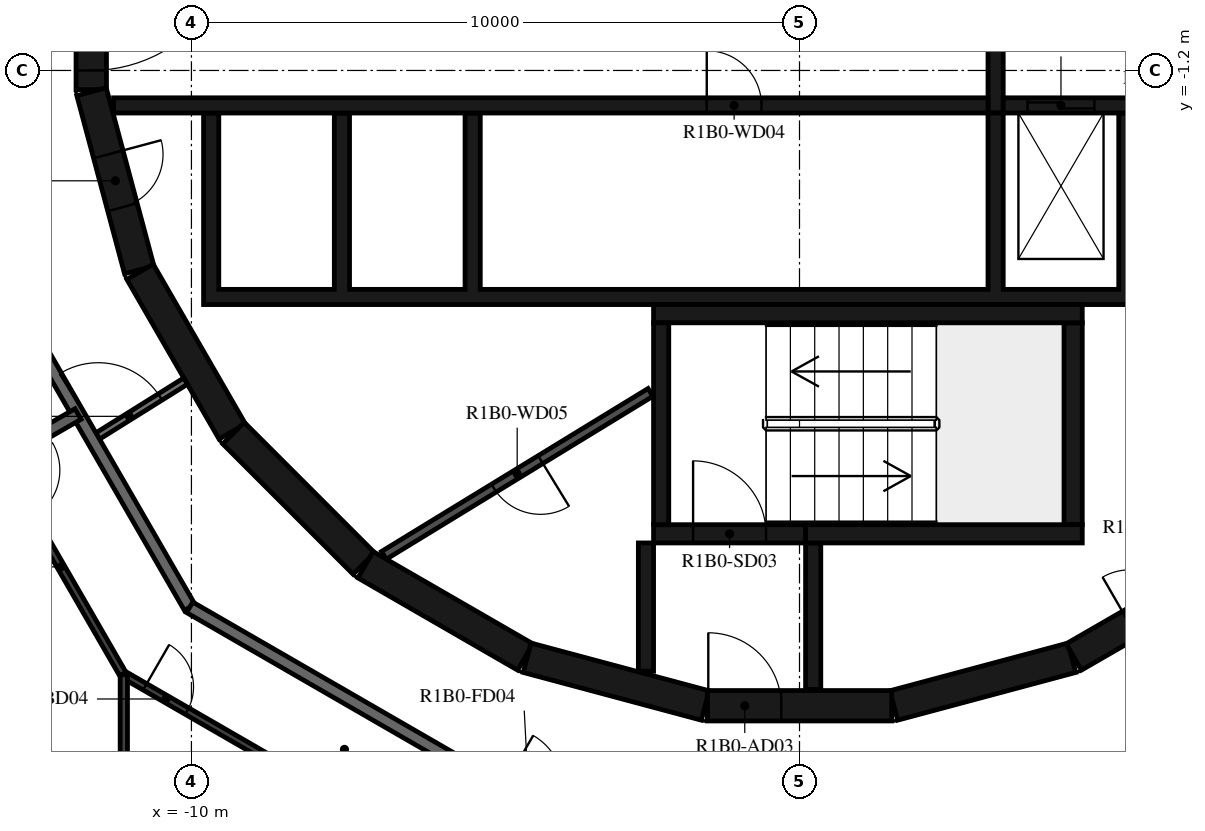
"""IFC4 building model, lengths in metres.
Left out: names, types, materials, properties, quantities, classifications, styles, units other than length and angle.
Written with IfcOpenShell. Run it as: python <this file> out.ifc"""

import sys

from ifc_helpers import new_model, si_unit, direction, frame, frame_2d, origin, place, context, subcontext, project, spatial, polyline, rectangle, outline, extrude, element, fill, save


model = new_model("IFC4")
c1 = context("Model", 3, precision=1e-05, world=origin(), true_north=direction((0.0, 1.0)))
c2 = subcontext(c1, "Body", "Model", "MODEL_VIEW")
j1 = project(units=[si_unit("LENGTHUNIT", "METRE"), si_unit("PLANEANGLEUNIT", "RADIAN")], contexts=[c1])
p1 = place(None, origin())
s1 = spatial("IfcSite", under=j1, at=p1, CompositionType="ELEMENT")
p2 = place(p1, origin())
s2 = spatial("IfcBuilding", under=s1, at=p2, CompositionType="ELEMENT")
p3 = place(p2, frame((0.0, 0.0, 52.4)))
s3 = spatial("IfcBuildingStorey", under=s2, at=p3, CompositionType="ELEMENT", Elevation=52.4)
p4 = place(p3, frame((1.55, -11.643, 0.0), z_axis=(0.0, 0.0, 1.0), x_axis=(0.965948410781, 0.258734743916, 0.0)))
e1 = element("IfcWall", 1, at=p4, inside=s3, PredefinedType="SHEAR", context=c2, shape_type="SweptSolid", body=[
    extrude(rectangle(XDim=3.033, YDim=0.5, at=frame_2d((1.516, 0.0))), origin(), (0.0, 0.0, 1.0), 3.12),
])
p5 = place(p3, frame((4.51, -10.845, 0.0), z_axis=(0.0, 0.0, 1.0), x_axis=(0.865975092491, 0.500087131594, 0.0)))
e2 = element("IfcWall", 2, at=p5, inside=s3, PredefinedType="SHEAR", context=c2, shape_type="SweptSolid", body=[
    extrude(rectangle(XDim=3.033, YDim=0.5, at=frame_2d((1.516, 0.0))), origin(), (0.0, 0.0, 1.0), 3.12),
])
p6 = place(p5, frame((1.066, 0.0, 0.0)))
e3 = element("IfcOpeningElement", 3, at=p6, cuts=e2, PredefinedType="OPENING", context=c2, shape_type="SweptSolid", body=[
    extrude(rectangle(XDim=0.9, YDim=2.1, at=frame_2d((0.45, 1.05))), frame((0.0, 0.26, 0.0), z_axis=(0.0, -1.0, 0.0), x_axis=(1.0, 0.0, 0.0)), (0.0, 0.0, 1.0), 0.52),
])
p7 = place(p3, frame((-11.647, 1.516, 0.0), z_axis=(0.0, 0.0, 1.0), x_axis=(0.0, -1.0, 0.0)))
e4 = element("IfcWall", 4, at=p7, inside=s3, PredefinedType="SHEAR", context=c2, shape_type="SweptSolid", body=[
    extrude(rectangle(XDim=3.033, YDim=0.5, at=frame_2d((1.516, 0.0))), origin(), (0.0, 0.0, 1.0), 3.12),
])
p8 = place(p7, frame((0.316, 0.0, 0.0)))
e5 = element("IfcOpeningElement", 5, at=p8, cuts=e4, PredefinedType="OPENING", context=c2, shape_type="SweptSolid", body=[
    extrude(rectangle(XDim=2.4, YDim=2.1, at=frame_2d((1.2, 1.05))), frame((0.0, 0.26, 0.0), z_axis=(0.0, -1.0, 0.0), x_axis=(1.0, 0.0, 0.0)), (0.0, 0.0, 1.0), 0.52),
])
p9 = place(p3, frame((-11.643, -1.55, 0.0), z_axis=(0.0, 0.0, 1.0), x_axis=(0.258734743916, -0.965948410781, 0.0)))
e6 = element("IfcWall", 6, at=p9, inside=s3, PredefinedType="SHEAR", context=c2, shape_type="SweptSolid", body=[
    extrude(rectangle(XDim=3.033, YDim=0.5, at=frame_2d((1.516, 0.0))), origin(), (0.0, 0.0, 1.0), 3.12),
])
p10 = place(p9, frame((1.066, 0.0, 0.0)))
e7 = element("IfcOpeningElement", 7, at=p10, cuts=e6, PredefinedType="OPENING", context=c2, shape_type="SweptSolid", body=[
    extrude(rectangle(XDim=0.9, YDim=2.1, at=frame_2d((0.45, 1.05))), frame((0.0, 0.26, 0.0), z_axis=(0.0, -1.0, 0.0), x_axis=(1.0, 0.0, 0.0)), (0.0, 0.0, 1.0), 0.52),
])
p11 = place(p3, frame((-10.845, -4.51, 0.0), z_axis=(0.0, 0.0, 1.0), x_axis=(0.500087131594, -0.865975092491, 0.0)))
e8 = element("IfcWall", 8, at=p11, inside=s3, PredefinedType="SHEAR", context=c2, shape_type="SweptSolid", body=[
    extrude(rectangle(XDim=3.033, YDim=0.5, at=frame_2d((1.516, 0.0))), origin(), (0.0, 0.0, 1.0), 3.12),
])
p12 = place(p3, frame((-9.308, -7.164, 0.0), z_axis=(0.0, 0.0, 1.0), x_axis=(0.707106781187, -0.707106781187, 0.0)))
e9 = element("IfcWall", 9, at=p12, inside=s3, PredefinedType="SHEAR", context=c2, shape_type="SweptSolid", body=[
    extrude(rectangle(XDim=3.032, YDim=0.5, at=frame_2d((1.516, 0.0))), origin(), (0.0, 0.0, 1.0), 3.12),
])
for number, where, z_axis, x_axis in (
    (10, (-7.137, -9.329, 0.0), (0.0, 0.0, 1.0), (0.866, -0.5, 0.0)),
    (11, (-4.479, -10.858, 0.0), (0.0, 0.0, 1.0), (0.966, -0.259, 0.0)),
):
    element("IfcWall", number, at=place(p3, frame(where, z_axis=z_axis, x_axis=x_axis)), inside=s3, PredefinedType="SHEAR", context=c2, shape_type="SweptSolid", body=[
        extrude(rectangle(XDim=3.033, YDim=0.5, at=frame_2d((1.516, 0.0))), origin(), (0.0, 0.0, 1.0), 3.12),
    ])
p13 = place(p3, frame((-1.516, -11.647, 0.0), z_axis=(0.0, 0.0, 1.0), x_axis=(1.0, 0.0, 0.0)))
e12 = element("IfcWall", 12, at=p13, inside=s3, PredefinedType="SHEAR", context=c2, shape_type="SweptSolid", body=[
    extrude(rectangle(XDim=3.033, YDim=0.5, at=frame_2d((1.516, 0.0))), origin(), (0.0, 0.0, 1.0), 3.12),
])
p14 = place(p13, frame((0.016, 0.0, 0.0)))
e13 = element("IfcOpeningElement", 13, at=p14, cuts=e12, PredefinedType="OPENING", context=c2, shape_type="SweptSolid", body=[
    extrude(rectangle(XDim=1.2, YDim=2.1, at=frame_2d((0.6, 1.05))), frame((0.0, 0.26, 0.0), z_axis=(0.0, -1.0, 0.0), x_axis=(1.0, 0.0, 0.0)), (0.0, 0.0, 1.0), 0.52),
])
p15 = place(p3, frame((-2.275, -8.67, 0.0), z_axis=(0.0, 0.0, 1.0), x_axis=(0.0, 1.0, 0.0)))
e14 = element("IfcWall", 14, at=p15, inside=s3, PredefinedType="SHEAR", context=c2, shape_type="SweptSolid", body=[
    extrude(rectangle(XDim=3.32, YDim=0.25, at=frame_2d((1.66, 0.0))), origin(), (0.0, 0.0, 1.0), 3.12),
])
p16 = place(p3, frame((-2.4, -5.2, 0.0), z_axis=(0.0, 0.0, 1.0), x_axis=(1.0, 0.0, 0.0)))
e15 = element("IfcWall", 15, at=p16, inside=s3, PredefinedType="SHEAR", context=c2, shape_type="SweptSolid", body=[
    extrude(rectangle(XDim=7.05, YDim=0.3, at=frame_2d((3.525, 0.0))), origin(), (0.0, 0.0, 1.0), 3.12),
])
p17 = place(p3, frame((4.5, -8.67, 0.0), z_axis=(0.0, 0.0, 1.0), x_axis=(0.0, 1.0, 0.0)))
e16 = element("IfcWall", 16, at=p17, inside=s3, PredefinedType="SHEAR", context=c2, shape_type="SweptSolid", body=[
    extrude(rectangle(XDim=3.32, YDim=0.3, at=frame_2d((1.66, 0.0))), origin(), (0.0, 0.0, 1.0), 3.12),
])
p18 = place(p3, frame((0.1, -8.82, 0.0), z_axis=(0.0, 0.0, 1.0), x_axis=(1.0, 0.0, 0.0)))
e17 = element("IfcWall", 17, at=p18, inside=s3, PredefinedType="SHEAR", context=c2, shape_type="SweptSolid", body=[
    extrude(rectangle(XDim=4.55, YDim=0.3, at=frame_2d((2.275, 0.0))), origin(), (0.0, 0.0, 1.0), 3.12),
])
p19 = place(p3, frame((-2.4, -8.82, 0.0), z_axis=(0.0, 0.0, 1.0), x_axis=(1.0, 0.0, 0.0)))
e18 = element("IfcWall", 18, at=p19, inside=s3, PredefinedType="SHEAR", context=c2, shape_type="SweptSolid", body=[
    extrude(rectangle(XDim=2.5, YDim=0.3, at=frame_2d((1.25, 0.0))), origin(), (0.0, 0.0, 1.0), 3.12),
])
p20 = place(p19, frame((0.65, 0.0, 0.0)))
e19 = element("IfcOpeningElement", 19, at=p20, cuts=e18, PredefinedType="OPENING", context=c2, shape_type="SweptSolid", body=[
    extrude(rectangle(XDim=1.2, YDim=2.1, at=frame_2d((0.6, 1.05))), frame((0.0, 0.16, 0.0), z_axis=(0.0, -1.0, 0.0), x_axis=(1.0, 0.0, 0.0)), (0.0, 0.0, 1.0), 0.32),
])
p21 = place(p3, frame((-2.525, -8.97, 0.0), z_axis=(0.0, 0.0, 1.0), x_axis=(0.0, -1.0, 0.0)))
e20 = element("IfcWall", 20, at=p21, inside=s3, PredefinedType="SHEAR", context=c2, shape_type="SweptSolid", body=[
    extrude(rectangle(XDim=2.11, YDim=0.25, at=frame_2d((1.055, 0.0))), origin(), (0.0, 0.0, 1.0), 3.12),
])
p22 = place(p3, frame((0.225, -8.97, 0.0), z_axis=(0.0, 0.0, 1.0), x_axis=(0.0, -1.0, 0.0)))
e21 = element("IfcWall", 21, at=p22, inside=s3, PredefinedType="SHEAR", context=c2, shape_type="SweptSolid", body=[
    extrude(rectangle(XDim=2.41, YDim=0.25, at=frame_2d((1.205, 0.0))), origin(), (0.0, 0.0, 1.0), 3.12),
])
p23 = place(p3, origin())
e22 = element("IfcWall", 22, at=p23, inside=s3, PredefinedType="SHEAR", context=c2, shape_type="SweptSolid", body=[
    extrude(outline(polyline([(9.8, -5.05), (9.8, -4.8), (9.8, -1.9), (9.55, -1.9), (9.55, -4.8), (7.65, -4.8), (7.65, -1.9), (7.4, -1.9), (7.4, -4.8), (5.5, -4.8), (5.5, -1.9), (5.25, -1.9), (5.25, -4.8), (3.35, -4.8), (3.35, -1.9), (3.1, -1.9), (3.1, -4.8), (-5.25, -4.8), (-5.25, -1.9), (-5.5, -1.9), (-5.5, -4.8), (-7.4, -4.8), (-7.4, -1.9), (-7.65, -1.9), (-7.65, -4.8), (-9.55, -4.8), (-9.55, -1.9), (-9.8, -1.9), (-9.8, -4.8), (-9.8, -5.05), (9.8, -5.05)])), origin(), (0.0, 0.0, 1.0), 3.12),
])
p24 = place(p3, frame((-11.28, -1.775, 0.0), z_axis=(0.0, 0.0, 1.0), x_axis=(1.0, 0.0, 0.0)))
e23 = element("IfcWall", 23, at=p24, inside=s3, PredefinedType="SHEAR", context=c2, shape_type="SweptSolid", body=[
    extrude(rectangle(XDim=14.38, YDim=0.25, at=frame_2d((7.19, 0.0))), origin(), (0.0, 0.0, 1.0), 3.12),
])
p25 = place(p24, frame((9.755, 0.0, 0.0)))
e24 = element("IfcOpeningElement", 24, at=p25, cuts=e23, PredefinedType="OPENING", context=c2, shape_type="SweptSolid", body=[
    extrude(rectangle(XDim=0.9, YDim=2.1, at=frame_2d((0.45, 1.05))), frame((0.0, 0.135, 0.0), z_axis=(0.0, -1.0, 0.0), x_axis=(1.0, 0.0, 0.0)), (0.0, 0.0, 1.0), 0.27),
])
p26 = place(p3, frame((3.35, -1.775, 0.0), z_axis=(0.0, 0.0, 1.0), x_axis=(1.0, 0.0, 0.0)))
e25 = element("IfcWall", 25, at=p26, inside=s3, PredefinedType="SHEAR", context=c2, shape_type="SweptSolid", body=[
    extrude(rectangle(XDim=7.93, YDim=0.25, at=frame_2d((3.965, 0.0))), origin(), (0.0, 0.0, 1.0), 3.12),
])
p27 = place(p26, frame((0.4, 0.0, 0.0)))
e26 = element("IfcOpeningElement", 26, at=p27, cuts=e25, PredefinedType="OPENING", context=c2, shape_type="SweptSolid", body=[
    extrude(rectangle(XDim=1.1, YDim=2.4, at=frame_2d((0.55, 1.2))), frame((0.0, 0.135, 0.0), z_axis=(0.0, -1.0, 0.0), x_axis=(1.0, 0.0, 0.0)), (0.0, 0.0, 1.0), 0.27),
])
p28 = place(p26, frame((2.55, 0.0, 0.0)))
e27 = element("IfcOpeningElement", 27, at=p28, cuts=e25, PredefinedType="OPENING", context=c2, shape_type="SweptSolid", body=[
    extrude(rectangle(XDim=1.1, YDim=2.4, at=frame_2d((0.55, 1.2))), frame((0.0, 0.135, 0.0), z_axis=(0.0, -1.0, 0.0), x_axis=(1.0, 0.0, 0.0)), (0.0, 0.0, 1.0), 0.27),
])
p29 = place(p26, frame((4.7, 0.0, 0.0)))
e28 = element("IfcOpeningElement", 28, at=p29, cuts=e25, PredefinedType="OPENING", context=c2, shape_type="SweptSolid", body=[
    extrude(rectangle(XDim=1.1, YDim=2.4, at=frame_2d((0.55, 1.2))), frame((0.0, 0.135, 0.0), z_axis=(0.0, -1.0, 0.0), x_axis=(1.0, 0.0, 0.0)), (0.0, 0.0, 1.0), 0.27),
])
p30 = place(p3, frame((3.225, -1.9, 0.0), z_axis=(0.0, 0.0, 1.0), x_axis=(0.0, 1.0, 0.0)))
e29 = element("IfcWall", 29, at=p30, inside=s3, PredefinedType="SHEAR", context=c2, shape_type="SweptSolid", body=[
    extrude(rectangle(XDim=3.8, YDim=0.25, at=frame_2d((1.9, 0.0))), origin(), (0.0, 0.0, 1.0), 3.12),
])
p31 = place(p3, frame((-2.451, -6.495, 0.0), z_axis=(0.0, 0.0, 1.0), x_axis=(-0.853250115418, -0.521501908471, 0.0)))
e30 = element("IfcWall", 30, at=p31, inside=s3, PredefinedType="PARTITIONING", context=c2, shape_type="SweptSolid", body=[
    extrude(rectangle(XDim=5.137, YDim=0.15, at=frame_2d((2.569, 0.0))), origin(), (0.0, 0.0, 1.0), 3.12),
])
p32 = place(p31, frame((2.119, 0.0, 0.0)))
e31 = element("IfcOpeningElement", 31, at=p32, cuts=e30, PredefinedType="OPENING", context=c2, shape_type="SweptSolid", body=[
    extrude(rectangle(XDim=0.9, YDim=2.1, at=frame_2d((0.45, 1.05))), frame((0.0, 0.085, 0.0), z_axis=(0.0, -1.0, 0.0), x_axis=(1.0, 0.0, 0.0)), (0.0, 0.0, 1.0), 0.17),
])
p33 = place(p3, frame((-11.625, -7.264, 0.0), z_axis=(0.0, 0.0, 1.0), x_axis=(0.84803632456, 0.529938102259, 0.0)))
e32 = element("IfcWall", 32, at=p33, inside=s3, PredefinedType="PARTITIONING", context=c2, shape_type="SweptSolid", body=[
    extrude(rectangle(XDim=1.804, YDim=0.12, at=frame_2d((0.902, 0.0))), origin(), (0.0, 0.0, 1.0), 3.12),
])
p34 = place(p33, frame((0.11, 0.0, 0.0)))
e33 = element("IfcOpeningElement", 33, at=p34, cuts=e32, PredefinedType="OPENING", context=c2, shape_type="SweptSolid", body=[
    extrude(rectangle(XDim=1.2, YDim=2.1, at=frame_2d((0.6, 1.05))), frame((0.0, 0.07, 0.0), z_axis=(0.0, -1.0, 0.0), x_axis=(1.0, 0.0, 0.0)), (0.0, 0.0, 1.0), 0.14),
])
p35 = place(p3, frame((-13.7, -3.671, 0.0), z_axis=(0.0, 0.0, 1.0), x_axis=(0.500001669485, -0.866024439905, 0.0)))
e34 = element("IfcWall", 34, at=p35, inside=s3, PredefinedType="STANDARD", context=c2, shape_type="SweptSolid", body=[
    extrude(rectangle(XDim=7.342, YDim=0.2, at=frame_2d((3.671, 0.0))), origin(), (0.0, 0.0, 1.0), 3.12),
])
p36 = place(p3, frame((-10.029, -10.029, 0.0), z_axis=(0.0, 0.0, 1.0), x_axis=(0.866022878987, -0.500004373052, 0.0)))
e35 = element("IfcWall", 35, at=p36, inside=s3, PredefinedType="STANDARD", context=c2, shape_type="SweptSolid", body=[
    extrude(rectangle(XDim=7.146, YDim=0.2, at=frame_2d((3.573, 0.0))), origin(), (0.0, 0.0, 1.0), 3.12),
])
p37 = place(p36, frame((5.947, 0.0, 0.0)))
e36 = element("IfcOpeningElement", 36, at=p37, cuts=e35, PredefinedType="OPENING", context=c2, shape_type="SweptSolid", body=[
    extrude(rectangle(XDim=1.0, YDim=2.1, at=frame_2d((0.5, 1.05))), frame((0.0, 0.11, 0.0), z_axis=(0.0, -1.0, 0.0), x_axis=(1.0, 0.0, 0.0)), (0.0, 0.0, 1.0), 0.22),
])
p38 = place(p3, frame((3.671, -13.7, 0.0), z_axis=(0.0, 0.0, 1.0), x_axis=(0.866024439905, 0.500001669485, 0.0)))
e37 = element("IfcWall", 37, at=p38, inside=s3, PredefinedType="STANDARD", context=c2, shape_type="SweptSolid", body=[
    extrude(rectangle(XDim=7.342, YDim=0.2, at=frame_2d((3.671, 0.0))), origin(), (0.0, 0.0, 1.0), 3.12),
])
p39 = place(p3, frame((-16.817, -9.709, 0.0), z_axis=(0.0, 0.0, 1.0), x_axis=(0.86604338933, 0.499968846828, 0.0)))
e38 = element("IfcWall", 38, at=p39, inside=s3, PredefinedType="STANDARD", context=c2, shape_type="SweptSolid", body=[
    extrude(rectangle(XDim=5.718, YDim=0.2, at=frame_2d((2.859, 0.0))), origin(), (0.0, 0.0, 1.0), 3.12),
])
p40 = place(p3, frame((-13.164, -7.6, 0.0), z_axis=(0.0, 0.0, 1.0), x_axis=(0.500000928893, -0.866024867487, 0.0)))
e39 = element("IfcWall", 39, at=p40, inside=s3, PredefinedType="PARTITIONING", context=c2, shape_type="SweptSolid", body=[
    extrude(rectangle(XDim=4.073, YDim=0.12, at=frame_2d((2.036, 0.0))), origin(), (0.0, 0.0, 1.0), 3.12),
])
p41 = place(p40, frame((0.2, 0.0, 0.0)))
e40 = element("IfcOpeningElement", 40, at=p41, cuts=e39, PredefinedType="OPENING", context=c2, shape_type="SweptSolid", body=[
    extrude(rectangle(XDim=0.9, YDim=2.1, at=frame_2d((0.45, 1.05))), frame((0.0, 0.07, 0.0), z_axis=(0.0, -1.0, 0.0), x_axis=(1.0, 0.0, 0.0)), (0.0, 0.0, 1.0), 0.14),
])
p42 = place(p3, frame((-11.112, -11.136, 0.0), z_axis=(0.0, 0.0, 1.0), x_axis=(0.866017718408, -0.500013311227, 0.0)))
e41 = element("IfcWall", 41, at=p42, inside=s3, PredefinedType="PARTITIONING", context=c2, shape_type="SweptSolid", body=[
    extrude(rectangle(XDim=6.588, YDim=0.12, at=frame_2d((3.294, 0.0))), origin(), (0.0, 0.0, 1.0), 3.12),
])
p43 = place(p42, frame((0.4, 0.0, 0.0)))
e42 = element("IfcOpeningElement", 42, at=p43, cuts=e41, PredefinedType="OPENING", context=c2, shape_type="SweptSolid", body=[
    extrude(rectangle(XDim=0.8, YDim=2.1, at=frame_2d((0.4, 1.05))), frame((0.0, 0.07, 0.0), z_axis=(0.0, -1.0, 0.0), x_axis=(1.0, 0.0, 0.0)), (0.0, 0.0, 1.0), 0.14),
])
p44 = place(p3, frame((-11.112, -14.43, 0.0), z_axis=(0.0, 0.0, 1.0), x_axis=(0.0, 1.0, 0.0)))
e43 = element("IfcWall", 43, at=p44, inside=s3, PredefinedType="PARTITIONING", context=c2, shape_type="SweptSolid", body=[
    extrude(rectangle(XDim=3.294, YDim=0.12, at=frame_2d((1.647, 0.0))), origin(), (0.0, 0.0, 1.0), 3.12),
])
p45 = place(p3, frame((4.613, -14.888, 0.0), z_axis=(0.0, 0.0, 1.0), x_axis=(0.866025608725, 0.499999645032, 0.0)))
e44 = element("IfcWall", 44, at=p45, inside=s3, PredefinedType="PARTITIONING", context=c2, shape_type="SweptSolid", body=[
    extrude(rectangle(XDim=7.522, YDim=0.12, at=frame_2d((3.761, 0.0))), origin(), (0.0, 0.0, 1.0), 3.12),
])
p46 = place(p45, frame((4.017, 0.0, 0.0)))
e45 = element("IfcOpeningElement", 45, at=p46, cuts=e44, PredefinedType="OPENING", context=c2, shape_type="SweptSolid", body=[
    extrude(rectangle(XDim=0.8, YDim=2.1, at=frame_2d((0.4, 1.05))), frame((0.0, 0.07, 0.0), z_axis=(0.0, -1.0, 0.0), x_axis=(1.0, 0.0, 0.0)), (0.0, 0.0, 1.0), 0.14),
])
p47 = place(p20, origin())
e46 = element("IfcDoor", 46, at=p47, inside=s3, OperationType="SINGLE_SWING_LEFT", PredefinedType="DOOR", context=c2, shape_type="SweptSolid", body=[
    extrude(rectangle(XDim=1.2, YDim=2.1, at=frame_2d((0.6, 1.05))), frame((0.0, 0.025, 0.0), z_axis=(0.0, -1.0, 0.0), x_axis=(1.0, 0.0, 0.0)), (0.0, 0.0, 1.0), 0.05),
])
fill(e19, e46)
p48 = place(p14, origin())
e47 = element("IfcDoor", 47, at=p48, inside=s3, OperationType="SINGLE_SWING_RIGHT", PredefinedType="DOOR", context=c2, shape_type="SweptSolid", body=[
    extrude(rectangle(XDim=1.2, YDim=2.1, at=frame_2d((0.6, 1.05))), frame((0.0, 0.025, 0.0), z_axis=(0.0, -1.0, 0.0), x_axis=(1.0, 0.0, 0.0)), (0.0, 0.0, 1.0), 0.05),
])
fill(e13, e47)
p49 = place(p8, origin())
e48 = element("IfcDoor", 48, at=p49, inside=s3, OperationType="DOUBLE_DOOR_SINGLE_SWING", PredefinedType="DOOR", context=c2, shape_type="SweptSolid", body=[
    extrude(rectangle(XDim=2.4, YDim=2.1, at=frame_2d((1.2, 1.05))), frame((0.0, 0.025, 0.0), z_axis=(0.0, -1.0, 0.0), x_axis=(1.0, 0.0, 0.0)), (0.0, 0.0, 1.0), 0.05),
])
fill(e5, e48)
p50 = place(p27, origin())
e49 = element("IfcDoor", 49, at=p50, inside=s3, OperationType="DOUBLE_DOOR_SLIDING", PredefinedType="DOOR", context=c2, shape_type="SweptSolid", body=[
    extrude(rectangle(XDim=1.1, YDim=2.4, at=frame_2d((0.55, 1.2))), frame((0.0, 0.025, 0.0), z_axis=(0.0, -1.0, 0.0), x_axis=(1.0, 0.0, 0.0)), (0.0, 0.0, 1.0), 0.05),
])
fill(e26, e49)
p51 = place(p25, origin())
e50 = element("IfcDoor", 50, at=p51, inside=s3, OperationType="SINGLE_SWING_LEFT", PredefinedType="DOOR", context=c2, shape_type="SweptSolid", body=[
    extrude(rectangle(XDim=0.9, YDim=2.1, at=frame_2d((0.45, 1.05))), frame((0.0, 0.025, 0.0), z_axis=(0.0, -1.0, 0.0), x_axis=(1.0, 0.0, 0.0)), (0.0, 0.0, 1.0), 0.05),
])
fill(e24, e50)
p52 = place(p32, origin())
e51 = element("IfcDoor", 51, at=p52, inside=s3, OperationType="SINGLE_SWING_RIGHT", PredefinedType="DOOR", context=c2, shape_type="SweptSolid", body=[
    extrude(rectangle(XDim=0.9, YDim=2.1, at=frame_2d((0.45, 1.05))), frame((0.0, 0.025, 0.0), z_axis=(0.0, -1.0, 0.0), x_axis=(1.0, 0.0, 0.0)), (0.0, 0.0, 1.0), 0.05),
])
fill(e31, e51)
p53 = place(p10, origin())
e52 = element("IfcDoor", 52, at=p53, inside=s3, OperationType="SINGLE_SWING_RIGHT", PredefinedType="DOOR", context=c2, shape_type="SweptSolid", body=[
    extrude(rectangle(XDim=0.9, YDim=2.1, at=frame_2d((0.45, 1.05))), frame((0.0, 0.025, 0.0), z_axis=(0.0, -1.0, 0.0), x_axis=(1.0, 0.0, 0.0)), (0.0, 0.0, 1.0), 0.05),
])
fill(e7, e52)
p54 = place(p43, origin())
e53 = element("IfcDoor", 53, at=p54, inside=s3, OperationType="SINGLE_SWING_LEFT", PredefinedType="DOOR", context=c2, shape_type="SweptSolid", body=[
    extrude(rectangle(XDim=0.8, YDim=2.1, at=frame_2d((0.4, 1.05))), frame((0.0, 0.025, 0.0), z_axis=(0.0, -1.0, 0.0), x_axis=(1.0, 0.0, 0.0)), (0.0, 0.0, 1.0), 0.05),
])
fill(e42, e53)
p55 = place(p34, origin())
e54 = element("IfcDoor", 54, at=p55, inside=s3, OperationType="DOUBLE_DOOR_SINGLE_SWING", PredefinedType="DOOR", context=c2, shape_type="SweptSolid", body=[
    extrude(rectangle(XDim=1.2, YDim=2.1, at=frame_2d((0.6, 1.05))), frame((0.0, 0.025, 0.0), z_axis=(0.0, -1.0, 0.0), x_axis=(1.0, 0.0, 0.0)), (0.0, 0.0, 1.0), 0.05),
])
fill(e33, e54)
save(model, sys.argv[1])
